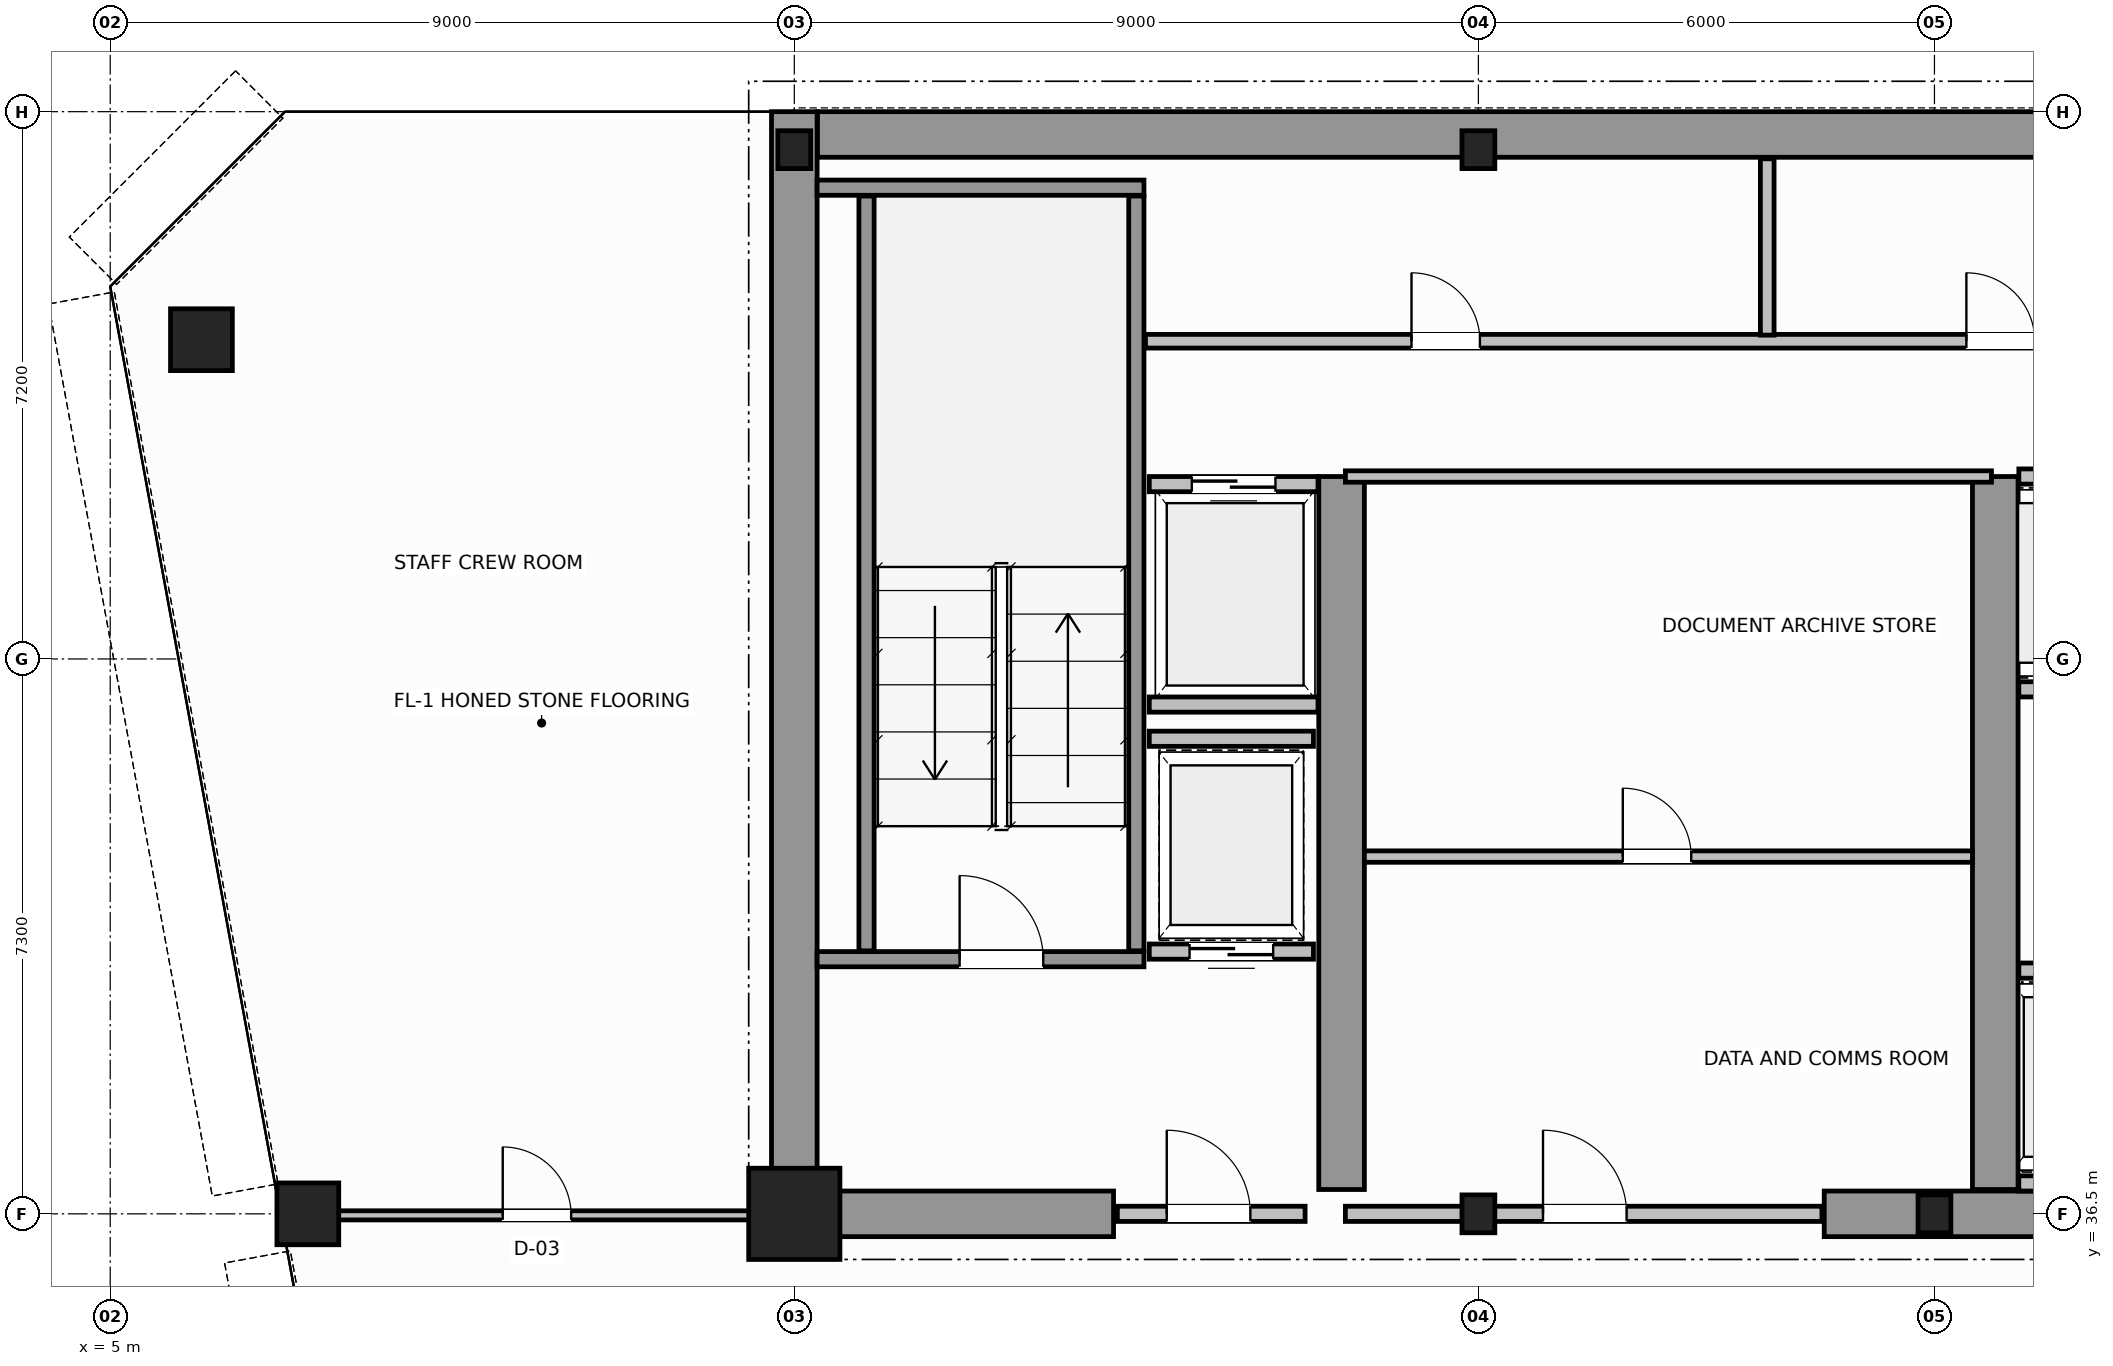
"""IFC4 building model, lengths in metres.
Left out: names, types, materials, properties, quantities, classifications, styles, units other than length and angle.
Written with IfcOpenShell. Run it as: python <this file> out.ifc"""

import sys

from ifc_helpers import new_model, si_unit, direction, frame, frame_2d, origin, origin_2d, place, context, subcontext, project, spatial, rectangle, hollow_circle, i_section, extrude, source, transform, mapped, element, fill, save


model = new_model("IFC4")
c1 = context("Model", 3, precision=1e-05, world=origin(), true_north=direction((0.0, 1.0)))
c2 = subcontext(c1, "Body", "Model", "MODEL_VIEW")
j1 = project(units=[si_unit("LENGTHUNIT", "METRE"), si_unit("PLANEANGLEUNIT", "RADIAN")], contexts=[c1])
p1 = place(None, origin())
s1 = spatial("IfcSite", under=j1, at=p1, CompositionType="ELEMENT")
p2 = place(p1, origin())
s2 = spatial("IfcBuilding", under=s1, at=p2, CompositionType="ELEMENT")
p3 = place(p2, frame((0.0, 0.0, 180.4)))
s3 = spatial("IfcBuildingStorey", under=s2, at=p3, CompositionType="ELEMENT", Elevation=180.4)
m1 = source(origin(), c2, "Body", "SweptSolid", [
    extrude(rectangle(XDim=1.2, YDim=1.2, at=origin_2d()), origin(), (0.0, 0.0, 1.0), 3.8),
])
p4 = place(p3, frame((14.0, 36.5, 0.0), z_axis=(0.0, 0.0, 1.0), x_axis=(1.0, 0.0, 0.0)))
e1 = element("IfcColumn", 1, at=p4, inside=s3, PredefinedType="COLUMN", context=c2, shape_type="MappedRepresentation", body=[
    mapped(m1, transform((0.0, 0.0, 0.0), scale=1.0)),
])
m2 = source(origin(), c2, "Body", "SweptSolid", [
    extrude(i_section(OverallWidth=0.432, OverallDepth=0.498, WebThickness=0.055, FlangeThickness=0.068, FilletRadius=0.015, at=origin_2d()), origin(), (0.0, 0.0, 1.0), 3.8),
])
for number, where, z_axis, x_axis in (
    (2, (23.0, 36.5, 0.0), (0.0, 0.0, 1.0), (1.0, 0.0, 0.0)),
    (3, (29.0, 36.5, 0.0), (0.0, 0.0, 1.0), (1.0, 0.0, 0.0)),
    (4, (14.0, 50.5, 0.0), (0.0, 0.0, 1.0), (1.0, 0.0, 0.0)),
    (5, (23.0, 50.5, 0.0), (0.0, 0.0, 1.0), (1.0, 0.0, 0.0)),
):
    element("IfcColumn", number, at=place(p3, frame(where, z_axis=z_axis, x_axis=x_axis)), inside=s3, PredefinedType="COLUMN", context=c2, shape_type="MappedRepresentation", body=[
        mapped(m2, transform((0.0, 0.0, 0.0), scale=1.0)),
    ])
m3 = source(origin(), c2, "Body", "SweptSolid", [
    extrude(hollow_circle(Radius=0.406, WallThickness=0.04, at=origin_2d()), origin(), (0.0, 0.0, 1.0), 3.8),
])
for number, where, z_axis, x_axis in (
    (6, (6.2, 48.0, 0.0), (0.0, 0.0, 1.0), (1.0, 0.0, 0.0)),
    (7, (7.6, 36.5, 0.0), (0.0, 0.0, 1.0), (1.0, 0.0, 0.0)),
):
    element("IfcColumn", number, at=place(p3, frame(where, z_axis=z_axis, x_axis=x_axis)), inside=s3, PredefinedType="COLUMN", context=c2, shape_type="MappedRepresentation", body=[
        mapped(m3, transform((0.0, 0.0, 0.0), scale=1.0)),
    ])
p5 = place(p3, frame((14.304, 50.7, 0.0), z_axis=(0.0, 0.0, 1.0), x_axis=(1.0, 0.0, 0.0)))
e8 = element("IfcWall", 8, at=p5, inside=s3, PredefinedType="SHEAR", context=c2, shape_type="SweptSolid", body=[
    extrude(rectangle(XDim=19.694, YDim=0.6, at=frame_2d((9.847, 0.0))), origin(), (0.0, 0.0, 1.0), 3.8),
])
p6 = place(p3, frame((14.0, 36.5, 0.0), z_axis=(0.0, 0.0, 1.0), x_axis=(0.0, 1.0, 0.0)))
e9 = element("IfcWall", 9, at=p6, inside=s3, PredefinedType="SHEAR", context=c2, shape_type="SweptSolid", body=[
    extrude(rectangle(XDim=14.5, YDim=0.6, at=frame_2d((7.25, 0.0))), origin(), (0.0, 0.0, 1.0), 3.8),
])
p7 = place(p3, frame((14.32, 36.5, 0.0), z_axis=(0.0, 0.0, 1.0), x_axis=(1.0, 0.0, 0.0)))
e10 = element("IfcWall", 10, at=p7, inside=s3, PredefinedType="SHEAR", context=c2, shape_type="SweptSolid", body=[
    extrude(rectangle(XDim=3.88, YDim=0.6, at=frame_2d((1.94, 0.0))), origin(), (0.0, 0.0, 1.0), 2.58),
])
p8 = place(p3, frame((27.55, 36.5, 0.0), z_axis=(0.0, 0.0, 1.0), x_axis=(1.0, 0.0, 0.0)))
e11 = element("IfcWall", 11, at=p8, inside=s3, PredefinedType="SHEAR", context=c2, shape_type="SweptSolid", body=[
    extrude(rectangle(XDim=4.5, YDim=0.6, at=frame_2d((2.25, 0.0))), origin(), (0.0, 0.0, 1.0), 3.8),
])
for number, where, z_axis, x_axis in (
    (12, (21.2, 36.82, 0.0), (0.0, 0.0, 1.0), (0.0, 1.0, 0.0)),
    (13, (29.8, 36.82, 0.0), (0.0, 0.0, 1.0), (0.0, 1.0, 0.0)),
):
    element("IfcWall", number, at=place(p3, frame(where, z_axis=z_axis, x_axis=x_axis)), inside=s3, PredefinedType="SHEAR", context=c2, shape_type="SweptSolid", body=[
        extrude(rectangle(XDim=9.38, YDim=0.6, at=frame_2d((4.69, 0.0))), origin(), (0.0, 0.0, 1.0), 3.8),
    ])
p9 = place(p3, frame((14.3, 39.85, 0.0), z_axis=(0.0, 0.0, 1.0), x_axis=(1.0, 0.0, 0.0)))
e14 = element("IfcWall", 14, at=p9, inside=s3, PredefinedType="SOLIDWALL", context=c2, shape_type="SweptSolid", body=[
    extrude(rectangle(XDim=4.3, YDim=0.2, at=frame_2d((2.15, 0.0))), origin(), (0.0, 0.0, 1.0), 3.8),
])
p10 = place(p9, frame((1.875, 0.0, 0.0)))
e15 = element("IfcOpeningElement", 15, at=p10, cuts=e14, PredefinedType="OPENING", context=c2, shape_type="SweptSolid", body=[
    extrude(rectangle(XDim=1.1, YDim=2.15, at=frame_2d((0.55, 1.075))), frame((0.0, 0.11, 0.0), z_axis=(0.0, -1.0, 0.0), x_axis=(1.0, 0.0, 0.0)), (0.0, 0.0, 1.0), 0.22),
])
p11 = place(p3, frame((14.3, 50.0, 0.0), z_axis=(0.0, 0.0, 1.0), x_axis=(1.0, 0.0, 0.0)))
e16 = element("IfcWall", 16, at=p11, inside=s3, PredefinedType="SOLIDWALL", context=c2, shape_type="SweptSolid", body=[
    extrude(rectangle(XDim=4.3, YDim=0.2, at=frame_2d((2.15, 0.0))), origin(), (0.0, 0.0, 1.0), 3.8),
])
for number, where, z_axis, x_axis in (
    (17, (14.95, 39.96, 0.0), (0.0, 0.0, 1.0), (0.0, 1.0, 0.0)),
    (18, (18.5, 39.96, 0.0), (0.0, 0.0, 1.0), (0.0, 1.0, 0.0)),
):
    element("IfcWall", number, at=place(p3, frame(where, z_axis=z_axis, x_axis=x_axis)), inside=s3, PredefinedType="SOLIDWALL", context=c2, shape_type="SweptSolid", body=[
        extrude(rectangle(XDim=9.93, YDim=0.2, at=frame_2d((4.965, 0.0))), origin(), (0.0, 0.0, 1.0), 3.8),
    ])
p12 = place(p3, frame((18.25, 36.5, 0.0), z_axis=(0.0, 0.0, 1.0), x_axis=(1.0, 0.0, 0.0)))
e19 = element("IfcWall", 19, at=p12, inside=s3, PredefinedType="SOLIDWALL", context=c2, shape_type="SweptSolid", body=[
    extrude(rectangle(XDim=2.47, YDim=0.2, at=frame_2d((1.235, 0.0))), origin(), (0.0, 0.0, 1.0), 2.57),
])
p13 = place(p12, frame((0.65, 0.0, 0.0)))
e20 = element("IfcOpeningElement", 20, at=p13, cuts=e19, PredefinedType="OPENING", context=c2, shape_type="SweptSolid", body=[
    extrude(rectangle(XDim=1.1, YDim=2.15, at=frame_2d((0.55, 1.075))), frame((0.0, 0.11, 0.0), z_axis=(0.0, -1.0, 0.0), x_axis=(1.0, 0.0, 0.0)), (0.0, 0.0, 1.0), 0.22),
])
p14 = place(p3, frame((30.11, 39.7, 0.0), z_axis=(0.0, 0.0, 1.0), x_axis=(1.0, 0.0, 0.0)))
e21 = element("IfcWall", 21, at=p14, inside=s3, PredefinedType="SOLIDWALL", context=c2, shape_type="SweptSolid", body=[
    extrude(rectangle(XDim=1.92, YDim=0.2, at=frame_2d((0.96, 0.0))), origin(), (0.0, 0.0, 1.0), 3.58),
])
p15 = place(p14, frame((0.41, 0.0, 0.0)))
e22 = element("IfcOpeningElement", 22, at=p15, cuts=e21, PredefinedType="OPENING", context=c2, shape_type="SweptSolid", body=[
    extrude(rectangle(XDim=1.1, YDim=2.15, at=frame_2d((0.55, 1.075))), frame((0.0, 0.11, 0.0), z_axis=(0.0, -1.0, 0.0), x_axis=(1.0, 0.0, 0.0)), (0.0, 0.0, 1.0), 0.22),
])
p16 = place(p3, frame((30.11, 36.9, 0.0), z_axis=(0.0, 0.0, 1.0), x_axis=(1.0, 0.0, 0.0)))
e23 = element("IfcWall", 23, at=p16, inside=s3, PredefinedType="SOLIDWALL", context=c2, shape_type="SweptSolid", body=[
    extrude(rectangle(XDim=1.92, YDim=0.2, at=frame_2d((0.96, 0.0))), origin(), (0.0, 0.0, 1.0), 3.58),
])
p17 = place(p3, frame((30.11, 43.4, 0.0), z_axis=(0.0, 0.0, 1.0), x_axis=(1.0, 0.0, 0.0)))
e24 = element("IfcWall", 24, at=p17, inside=s3, PredefinedType="SOLIDWALL", context=c2, shape_type="SweptSolid", body=[
    extrude(rectangle(XDim=1.8, YDim=0.2, at=frame_2d((0.9, 0.0))), origin(), (0.0, 0.0, 1.0), 3.58),
])
p18 = place(p17, frame((0.35, 0.0, 0.0)))
e25 = element("IfcOpeningElement", 25, at=p18, cuts=e24, PredefinedType="OPENING", context=c2, shape_type="SweptSolid", body=[
    extrude(rectangle(XDim=1.1, YDim=2.15, at=frame_2d((0.55, 1.075))), frame((0.0, 0.11, 0.0), z_axis=(0.0, -1.0, 0.0), x_axis=(1.0, 0.0, 0.0)), (0.0, 0.0, 1.0), 0.22),
])
p19 = place(p3, frame((30.11, 46.2, 0.0), z_axis=(0.0, 0.0, 1.0), x_axis=(1.0, 0.0, 0.0)))
e26 = element("IfcWall", 26, at=p19, inside=s3, PredefinedType="SOLIDWALL", context=c2, shape_type="SweptSolid", body=[
    extrude(rectangle(XDim=1.8, YDim=0.2, at=frame_2d((0.9, 0.0))), origin(), (0.0, 0.0, 1.0), 3.58),
])
p20 = place(p3, frame((18.67, 46.1, 0.0), z_axis=(0.0, 0.0, 1.0), x_axis=(1.0, 0.0, 0.0)))
e27 = element("IfcWall", 27, at=p20, inside=s3, PredefinedType="SOLIDWALL", context=c2, shape_type="SweptSolid", body=[
    extrude(rectangle(XDim=2.22, YDim=0.2, at=frame_2d((1.11, 0.0))), origin(), (0.0, 0.0, 1.0), 3.58),
])
p21 = place(p20, frame((0.56, 0.0, 0.0)))
e28 = element("IfcOpeningElement", 28, at=p21, cuts=e27, PredefinedType="OPENING", context=c2, shape_type="SweptSolid", body=[
    extrude(rectangle(XDim=1.1, YDim=2.15, at=frame_2d((0.55, 1.075))), frame((0.0, 0.11, 0.0), z_axis=(0.0, -1.0, 0.0), x_axis=(1.0, 0.0, 0.0)), (0.0, 0.0, 1.0), 0.22),
])
p22 = place(p3, frame((18.67, 43.2, 0.0), z_axis=(0.0, 0.0, 1.0), x_axis=(1.0, 0.0, 0.0)))
e29 = element("IfcWall", 29, at=p22, inside=s3, PredefinedType="SOLIDWALL", context=c2, shape_type="SweptSolid", body=[
    extrude(rectangle(XDim=2.22, YDim=0.2, at=frame_2d((1.11, 0.0))), origin(), (0.0, 0.0, 1.0), 3.58),
])
p23 = place(p3, frame((18.67, 39.95, 0.0), z_axis=(0.0, 0.0, 1.0), x_axis=(1.0, 0.0, 0.0)))
e30 = element("IfcWall", 30, at=p23, inside=s3, PredefinedType="SOLIDWALL", context=c2, shape_type="SweptSolid", body=[
    extrude(rectangle(XDim=2.16, YDim=0.2, at=frame_2d((1.08, 0.0))), origin(), (0.0, 0.0, 1.0), 3.58),
])
p24 = place(p23, frame((0.53, 0.0, 0.0)))
e31 = element("IfcOpeningElement", 31, at=p24, cuts=e30, PredefinedType="OPENING", context=c2, shape_type="SweptSolid", body=[
    extrude(rectangle(XDim=1.1, YDim=2.15, at=frame_2d((0.55, 1.075))), frame((0.0, 0.11, 0.0), z_axis=(0.0, -1.0, 0.0), x_axis=(1.0, 0.0, 0.0)), (0.0, 0.0, 1.0), 0.22),
])
p25 = place(p3, frame((18.67, 42.75, 0.0), z_axis=(0.0, 0.0, 1.0), x_axis=(1.0, 0.0, 0.0)))
e32 = element("IfcWall", 32, at=p25, inside=s3, PredefinedType="SOLIDWALL", context=c2, shape_type="SweptSolid", body=[
    extrude(rectangle(XDim=2.16, YDim=0.2, at=frame_2d((1.08, 0.0))), origin(), (0.0, 0.0, 1.0), 3.58),
])
p26 = place(p3, frame((21.25, 36.5, 0.0), z_axis=(0.0, 0.0, 1.0), x_axis=(1.0, 0.0, 0.0)))
e33 = element("IfcWall", 33, at=p26, inside=s3, PredefinedType="SOLIDWALL", context=c2, shape_type="SweptSolid", body=[
    extrude(rectangle(XDim=6.27, YDim=0.2, at=frame_2d((3.135, 0.0))), origin(), (0.0, 0.0, 1.0), 2.57),
])
p27 = place(p26, frame((2.6, 0.0, 0.0)))
e34 = element("IfcOpeningElement", 34, at=p27, cuts=e33, PredefinedType="OPENING", context=c2, shape_type="SweptSolid", body=[
    extrude(rectangle(XDim=1.1, YDim=2.15, at=frame_2d((0.55, 1.075))), frame((0.0, 0.11, 0.0), z_axis=(0.0, -1.0, 0.0), x_axis=(1.0, 0.0, 0.0)), (0.0, 0.0, 1.0), 0.22),
])
p28 = place(p3, frame((21.25, 46.2, 0.0), z_axis=(0.0, 0.0, 1.0), x_axis=(1.0, 0.0, 0.0)))
e35 = element("IfcWall", 35, at=p28, inside=s3, PredefinedType="PARTITIONING", context=c2, shape_type="SweptSolid", body=[
    extrude(rectangle(XDim=8.5, YDim=0.15, at=frame_2d((4.25, 0.0))), origin(), (0.0, 0.0, 1.0), 3.58),
])
p29 = place(p3, frame((21.5, 41.2, 0.0), z_axis=(0.0, 0.0, 1.0), x_axis=(1.0, 0.0, 0.0)))
e36 = element("IfcWall", 36, at=p29, inside=s3, PredefinedType="PARTITIONING", context=c2, shape_type="SweptSolid", body=[
    extrude(rectangle(XDim=8.0, YDim=0.15, at=frame_2d((4.0, 0.0))), origin(), (0.0, 0.0, 1.0), 3.58),
])
p30 = place(p29, frame((3.4, 0.0, 0.0)))
e37 = element("IfcOpeningElement", 37, at=p30, cuts=e36, PredefinedType="OPENING", context=c2, shape_type="SweptSolid", body=[
    extrude(rectangle(XDim=0.9, YDim=2.1, at=frame_2d((0.45, 1.05))), frame((0.0, 0.085, 0.0), z_axis=(0.0, -1.0, 0.0), x_axis=(1.0, 0.0, 0.0)), (0.0, 0.0, 1.0), 0.17),
])
p31 = place(p3, frame((18.62, 47.98, 0.0), z_axis=(0.0, 0.0, 1.0), x_axis=(1.0, 0.0, 0.0)))
e38 = element("IfcWall", 38, at=p31, inside=s3, PredefinedType="PLUMBINGWALL", context=c2, shape_type="SweptSolid", body=[
    extrude(rectangle(XDim=20.06, YDim=0.18, at=frame_2d((10.03, 0.0))), origin(), (0.0, 0.0, 1.0), 3.58),
])
p32 = place(p31, frame((3.5, 0.0, 0.0)))
e39 = element("IfcOpeningElement", 39, at=p32, cuts=e38, PredefinedType="OPENING", context=c2, shape_type="SweptSolid", body=[
    extrude(rectangle(XDim=0.9, YDim=2.15, at=frame_2d((0.45, 1.075))), frame((0.0, 0.1, 0.0), z_axis=(0.0, -1.0, 0.0), x_axis=(1.0, 0.0, 0.0)), (0.0, 0.0, 1.0), 0.2),
])
p33 = place(p31, frame((10.8, 0.0, 0.0)))
e40 = element("IfcOpeningElement", 40, at=p33, cuts=e38, PredefinedType="OPENING", context=c2, shape_type="SweptSolid", body=[
    extrude(rectangle(XDim=0.9, YDim=2.15, at=frame_2d((0.45, 1.075))), frame((0.0, 0.1, 0.0), z_axis=(0.0, -1.0, 0.0), x_axis=(1.0, 0.0, 0.0)), (0.0, 0.0, 1.0), 0.2),
])
p34 = place(p31, frame((16.8, 0.0, 0.0)))
e41 = element("IfcOpeningElement", 41, at=p34, cuts=e38, PredefinedType="OPENING", context=c2, shape_type="SweptSolid", body=[
    extrude(rectangle(XDim=0.9, YDim=2.15, at=frame_2d((0.45, 1.075))), frame((0.0, 0.1, 0.0), z_axis=(0.0, -1.0, 0.0), x_axis=(1.0, 0.0, 0.0)), (0.0, 0.0, 1.0), 0.2),
])
p35 = place(p3, frame((26.8, 48.06, 0.0), z_axis=(0.0, 0.0, 1.0), x_axis=(0.0, 1.0, 0.0)))
e42 = element("IfcWall", 42, at=p35, inside=s3, PredefinedType="PLUMBINGWALL", context=c2, shape_type="SweptSolid", body=[
    extrude(rectangle(XDim=2.32, YDim=0.18, at=frame_2d((1.16, 0.0))), origin(), (0.0, 0.0, 1.0), 3.58),
])
p36 = place(p3, frame((7.289, 36.48, 0.0), z_axis=(0.0, 0.0, 1.0), x_axis=(1.0, 0.0, 0.0)))
e43 = element("IfcWall", 43, at=p36, inside=s3, PredefinedType="PARTITIONING", context=c2, shape_type="SweptSolid", body=[
    extrude(rectangle(XDim=6.651, YDim=0.12, at=frame_2d((3.325, 0.0))), origin(), (0.0, 0.0, 1.0), 2.97),
])
p37 = place(p36, frame((2.875, 0.0, 0.0)))
e44 = element("IfcOpeningElement", 44, at=p37, cuts=e43, PredefinedType="OPENING", context=c2, shape_type="SweptSolid", body=[
    extrude(rectangle(XDim=0.9, YDim=2.15, at=frame_2d((0.45, 1.075))), frame((0.0, 0.07, 0.0), z_axis=(0.0, -1.0, 0.0), x_axis=(1.0, 0.0, 0.0)), (0.0, 0.0, 1.0), 0.14),
])
m4 = source(origin(), c2, "Body", "SweptSolid", [
    extrude(rectangle(XDim=1.1, YDim=2.15, at=frame_2d((0.55, 1.075))), frame((0.0, 0.025, 0.0), z_axis=(0.0, -1.0, 0.0), x_axis=(1.0, 0.0, 0.0)), (0.0, 0.0, 1.0), 0.05),
])
p38 = place(p10, origin())
e45 = element("IfcDoor", 45, at=p38, inside=s3, OperationType="SINGLE_SWING_LEFT", PredefinedType="DOOR", context=c2, shape_type="MappedRepresentation", body=[
    mapped(m4, transform((0.0, 0.0, 0.0), scale=1.0)),
])
fill(e15, e45)
p39 = place(p13, origin())
e46 = element("IfcDoor", 46, at=p39, inside=s3, OperationType="SINGLE_SWING_RIGHT", PredefinedType="DOOR", context=c2, shape_type="MappedRepresentation", body=[
    mapped(m4, transform((0.0, 0.0, 0.0), scale=1.0)),
])
fill(e20, e46)
p40 = place(p21, origin())
e47 = element("IfcDoor", 47, at=p40, inside=s3, OperationType="DOUBLE_DOOR_SLIDING", PredefinedType="DOOR", context=c2, shape_type="MappedRepresentation", body=[
    mapped(m4, transform((0.0, 0.0, 0.0), scale=1.0)),
])
fill(e28, e47)
p41 = place(p24, origin())
e48 = element("IfcDoor", 48, at=p41, inside=s3, OperationType="DOUBLE_DOOR_SLIDING", PredefinedType="DOOR", context=c2, shape_type="MappedRepresentation", body=[
    mapped(m4, transform((0.0, 0.0, 0.0), scale=1.0)),
])
fill(e31, e48)
p42 = place(p27, origin())
e49 = element("IfcDoor", 49, at=p42, inside=s3, OperationType="SINGLE_SWING_LEFT", PredefinedType="DOOR", context=c2, shape_type="MappedRepresentation", body=[
    mapped(m4, transform((0.0, 0.0, 0.0), scale=1.0)),
])
fill(e34, e49)
m5 = source(origin(), c2, "Body", "SweptSolid", [
    extrude(rectangle(XDim=0.9, YDim=2.1, at=frame_2d((0.45, 1.05))), frame((0.0, 0.025, 0.0), z_axis=(0.0, -1.0, 0.0), x_axis=(1.0, 0.0, 0.0)), (0.0, 0.0, 1.0), 0.05),
])
p43 = place(p30, origin())
e50 = element("IfcDoor", 50, at=p43, inside=s3, OperationType="SINGLE_SWING_RIGHT", PredefinedType="DOOR", context=c2, shape_type="MappedRepresentation", body=[
    mapped(m5, transform((0.0, 0.0, 0.0), scale=1.0)),
])
fill(e37, e50)
m6 = source(origin(), c2, "Body", "SweptSolid", [
    extrude(rectangle(XDim=0.9, YDim=2.15, at=frame_2d((0.45, 1.075))), frame((0.0, 0.025, 0.0), z_axis=(0.0, -1.0, 0.0), x_axis=(1.0, 0.0, 0.0)), (0.0, 0.0, 1.0), 0.05),
])
p44 = place(p32, origin())
e51 = element("IfcDoor", 51, at=p44, inside=s3, OperationType="SINGLE_SWING_LEFT", PredefinedType="DOOR", context=c2, shape_type="MappedRepresentation", body=[
    mapped(m6, transform((0.0, 0.0, 0.0), scale=1.0)),
])
fill(e39, e51)
p45 = place(p33, origin())
e52 = element("IfcDoor", 52, at=p45, inside=s3, OperationType="SINGLE_SWING_RIGHT", PredefinedType="DOOR", context=c2, shape_type="MappedRepresentation", body=[
    mapped(m6, transform((0.0, 0.0, 0.0), scale=1.0)),
])
fill(e40, e52)
p46 = place(p37, origin())
e53 = element("IfcDoor", 53, at=p46, inside=s3, OperationType="SINGLE_SWING_LEFT", PredefinedType="DOOR", context=c2, shape_type="MappedRepresentation", body=[
    mapped(m6, transform((0.0, 0.0, 0.0), scale=1.0)),
])
fill(e44, e53)
save(model, sys.argv[1])
